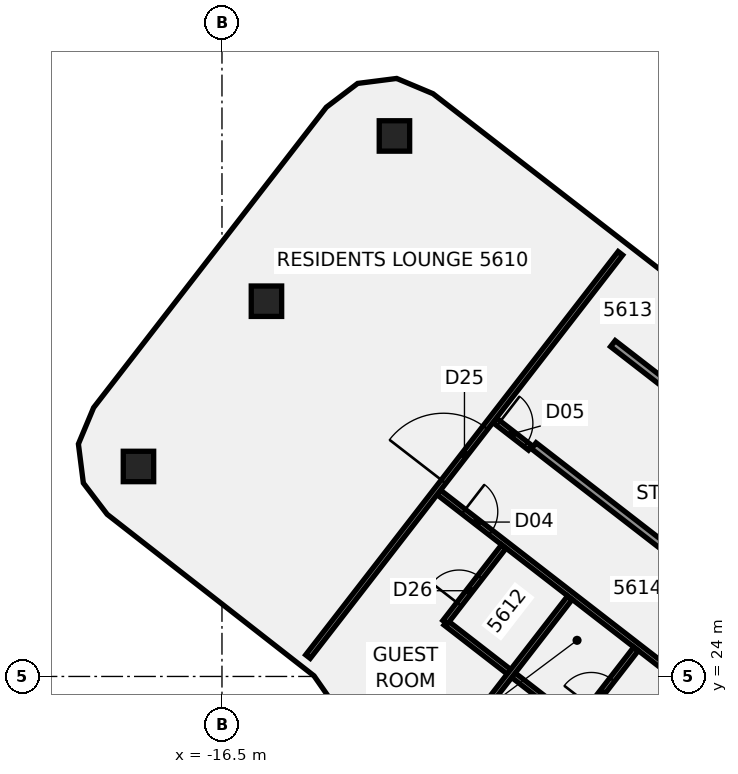
"""IFC4 building model, lengths in metres.
Left out: names, types, materials, properties, quantities, classifications, styles, units other than length and angle.
Written with IfcOpenShell. Run it as: python <this file> out.ifc"""

import sys

from ifc_helpers import new_model, si_unit, direction, frame, frame_2d, origin, origin_2d, place, context, subcontext, project, spatial, polyline, rectangle, outline, extrude, element, fill, save


model = new_model("IFC4")
c1 = context("Model", 3, precision=1e-05, world=origin(), true_north=direction((0.0, 1.0)))
c2 = subcontext(c1, "Body", "Model", "MODEL_VIEW")
j1 = project(units=[si_unit("LENGTHUNIT", "METRE"), si_unit("PLANEANGLEUNIT", "RADIAN")], contexts=[c1])
p1 = place(None, origin())
s1 = spatial("IfcSite", under=j1, at=p1, CompositionType="ELEMENT")
p2 = place(p1, origin())
s2 = spatial("IfcBuilding", under=s1, at=p2, CompositionType="ELEMENT")
p3 = place(p2, frame((0.0, 0.0, 223.5)))
s3 = spatial("IfcBuildingStorey", under=s2, at=p3, CompositionType="ELEMENT", Elevation=223.5)
p4 = place(p3, frame((-11.962, 38.222, -0.138), z_axis=(-0.01511273636, -0.110174546765, 0.993797350794), x_axis=(0.611561929785, 0.785306683932, 0.09636087489)))
e1 = element("IfcColumn", 1, at=p4, inside=s3, PredefinedType="COLUMN", context=c2, shape_type="SweptSolid", body=[
    extrude(rectangle(XDim=0.8, YDim=0.8, at=origin_2d()), origin(), (0.0, 0.0, 1.0), 3.619),
])
p5 = place(p3, frame((-15.33, 33.874, -0.138), z_axis=(0.00693650332, -0.126675366464, 0.991919974823), x_axis=(0.612511383983, 0.784620582282, 0.095918435924)))
e2 = element("IfcColumn", 2, at=p5, inside=s3, PredefinedType="COLUMN", context=c2, shape_type="SweptSolid", body=[
    extrude(rectangle(XDim=0.8, YDim=0.8, at=origin_2d()), origin(), (0.0, 0.0, 1.0), 3.625),
])
p6 = place(p3, frame((-18.698, 29.525, -0.138), z_axis=(0.028814660516, -0.142998629925, 0.989303344369), x_axis=(0.613802886994, 0.783674160284, 0.095398251662)))
e3 = element("IfcColumn", 3, at=p6, inside=s3, PredefinedType="COLUMN", context=c2, shape_type="SweptSolid", body=[
    extrude(rectangle(XDim=0.8, YDim=0.8, at=origin_2d()), origin(), (0.0, 0.0, 1.0), 3.635),
])
p7 = place(p3, frame((-10.791, 28.84, 0.0), z_axis=(0.0, 0.0, 1.0), x_axis=(0.790613040496, -0.612316111333, 0.0)))
e4 = element("IfcWall", 4, at=p7, inside=s3, PredefinedType="PARTITIONING", context=c2, shape_type="SweptSolid", body=[
    extrude(rectangle(XDim=8.82, YDim=0.15, at=frame_2d((4.41, 0.0))), origin(), (0.0, 0.0, 1.0), 2.864),
])
p8 = place(p7, frame((7.37, 0.0, 0.0)))
e5 = element("IfcOpeningElement", 5, at=p8, cuts=e4, PredefinedType="OPENING", context=c2, shape_type="SweptSolid", body=[
    extrude(rectangle(XDim=0.9, YDim=2.1, at=frame_2d((0.45, 1.05))), frame((0.0, 0.085, 0.0), z_axis=(0.0, -1.0, 0.0), x_axis=(1.0, 0.0, 0.0)), (0.0, 0.0, 1.0), 0.17),
])
p9 = place(p7, frame((0.82, 0.0, 0.0)))
e6 = element("IfcOpeningElement", 6, at=p9, cuts=e4, PredefinedType="OPENING", context=c2, shape_type="SweptSolid", body=[
    extrude(rectangle(XDim=0.9, YDim=2.1, at=frame_2d((0.45, 1.05))), frame((0.0, 0.085, 0.0), z_axis=(0.0, -1.0, 0.0), x_axis=(1.0, 0.0, 0.0)), (0.0, 0.0, 1.0), 0.17),
])
p10 = place(p3, frame((-10.612, 25.414, 0.0), z_axis=(0.0, 0.0, 1.0), x_axis=(0.790364214812, -0.612637256412, 0.0)))
e7 = element("IfcWall", 7, at=p10, inside=s3, PredefinedType="PARTITIONING", context=c2, shape_type="SweptSolid", body=[
    extrude(rectangle(XDim=4.36, YDim=0.15, at=frame_2d((2.18, 0.0))), origin(), (0.0, 0.0, 1.0), 2.864),
])
p11 = place(p3, frame((-9.322, 30.738, 0.0), z_axis=(0.0, 0.0, 1.0), x_axis=(0.790620333451, -0.612306694667, 0.0)))
e8 = element("IfcWall", 8, at=p11, inside=s3, PredefinedType="PARTITIONING", context=c2, shape_type="SweptSolid", body=[
    extrude(rectangle(XDim=1.18, YDim=0.15, at=frame_2d((0.59, 0.0))), origin(), (0.0, 0.0, 1.0), 2.864),
])
p12 = place(p11, frame((0.13, 0.0, 0.0)))
e9 = element("IfcOpeningElement", 9, at=p12, cuts=e8, PredefinedType="OPENING", context=c2, shape_type="SweptSolid", body=[
    extrude(rectangle(XDim=0.9, YDim=2.1, at=frame_2d((0.45, 1.05))), frame((0.0, 0.085, 0.0), z_axis=(0.0, -1.0, 0.0), x_axis=(1.0, 0.0, 0.0)), (0.0, 0.0, 1.0), 0.17),
])
p13 = place(p3, frame((-14.237, 24.522, 0.0), z_axis=(0.0, 0.0, 1.0), x_axis=(0.612428480312, 0.79052599989, 0.0)))
e10 = element("IfcWall", 10, at=p13, inside=s3, PredefinedType="PARTITIONING", context=c2, shape_type="SweptSolid", body=[
    extrude(rectangle(XDim=13.423, YDim=0.15, at=frame_2d((6.711, 0.0))), origin(), (0.0, 0.0, 1.0), 2.864),
])
p14 = place(p13, frame((5.824, 0.0, 0.0)))
e11 = element("IfcOpeningElement", 11, at=p14, cuts=e10, PredefinedType="OPENING", context=c2, shape_type="SweptSolid", body=[
    extrude(rectangle(XDim=1.8, YDim=2.1, at=frame_2d((0.9, 1.05))), frame((0.0, 0.085, 0.0), z_axis=(0.0, -1.0, 0.0), x_axis=(1.0, 0.0, 0.0)), (0.0, 0.0, 1.0), 0.17),
])
p15 = place(p3, frame((-9.68, 23.057, 0.0), z_axis=(0.0, 0.0, 1.0), x_axis=(0.612369549525, 0.790571650652, 0.0)))
e12 = element("IfcWall", 12, at=p15, inside=s3, PredefinedType="PARTITIONING", context=c2, shape_type="SweptSolid", body=[
    extrude(rectangle(XDim=3.811, YDim=0.15, at=frame_2d((1.906, 0.0))), origin(), (0.0, 0.0, 1.0), 2.864),
])
p16 = place(p3, frame((-10.628, 25.426, 0.0), z_axis=(0.0, 0.0, 1.0), x_axis=(0.61242333075, 0.790529989281, 0.0)))
e13 = element("IfcWall", 13, at=p16, inside=s3, PredefinedType="PARTITIONING", context=c2, shape_type="SweptSolid", body=[
    extrude(rectangle(XDim=2.52, YDim=0.15, at=frame_2d((1.26, 0.0))), origin(), (0.0, 0.0, 1.0), 2.864),
])
p17 = place(p16, frame((0.6, 0.0, 0.0)))
e14 = element("IfcOpeningElement", 14, at=p17, cuts=e13, PredefinedType="OPENING", context=c2, shape_type="SweptSolid", body=[
    extrude(rectangle(XDim=0.9, YDim=2.1, at=frame_2d((0.45, 1.05))), frame((0.0, 0.085, 0.0), z_axis=(0.0, -1.0, 0.0), x_axis=(1.0, 0.0, 0.0)), (0.0, 0.0, 1.0), 0.17),
])
p18 = place(p3, frame((-7.15, 22.731, 0.0), z_axis=(0.0, 0.0, 1.0), x_axis=(0.612430986652, 0.790524058197, 0.0)))
e15 = element("IfcWall", 15, at=p18, inside=s3, PredefinedType="PARTITIONING", context=c2, shape_type="SweptSolid", body=[
    extrude(rectangle(XDim=2.521, YDim=0.15, at=frame_2d((1.26, 0.0))), origin(), (0.0, 0.0, 1.0), 2.864),
])
p19 = place(p18, frame((0.6, 0.0, 0.0)))
e16 = element("IfcOpeningElement", 16, at=p19, cuts=e15, PredefinedType="OPENING", context=c2, shape_type="SweptSolid", body=[
    extrude(rectangle(XDim=0.9, YDim=2.1, at=frame_2d((0.45, 1.05))), frame((0.0, 0.085, 0.0), z_axis=(0.0, -1.0, 0.0), x_axis=(1.0, 0.0, 0.0)), (0.0, 0.0, 1.0), 0.17),
])
p20 = place(p3, frame((-2.999, 25.967, -0.14), z_axis=(0.0, 0.0, 1.0), x_axis=(-0.790580869813, 0.612357647364, 0.0)))
e17 = element("IfcWall", 17, at=p20, inside=s3, PredefinedType="SHEAR", context=c2, shape_type="SweptSolid", body=[
    extrude(rectangle(XDim=6.7, YDim=0.2, at=frame_2d((3.35, 0.0))), origin(), (0.0, 0.0, 1.0), 3.004),
])
p21 = place(p20, frame((0.35, 0.0, 0.0)))
e18 = element("IfcOpeningElement", 18, at=p21, cuts=e17, PredefinedType="OPENING", context=c2, shape_type="SweptSolid", body=[
    extrude(rectangle(XDim=1.0, YDim=2.1, at=frame_2d((0.5, 1.05))), frame((0.0, 0.11, 0.0), z_axis=(0.0, -1.0, 0.0), x_axis=(1.0, 0.0, 0.0)), (0.0, 0.0, 1.0), 0.22),
])
p22 = place(p3, frame((-0.917, 28.655, -0.14), z_axis=(0.0, 0.0, 1.0), x_axis=(-0.790580869813, 0.612357647364, 0.0)))
e19 = element("IfcWall", 19, at=p22, inside=s3, PredefinedType="SHEAR", context=c2, shape_type="SweptSolid", body=[
    extrude(rectangle(XDim=6.7, YDim=0.2, at=frame_2d((3.35, 0.0))), origin(), (0.0, 0.0, 1.0), 3.004),
])
p23 = place(p3, frame((0.0, 0.0, -0.14)))
e20 = element("IfcWall", 20, at=p23, inside=s3, PredefinedType="SHEAR", context=c2, shape_type="SweptSolid", body=[
    extrude(outline(polyline([(-6.117, 32.556), (-6.275, 32.679), (-8.234, 30.149), (-8.076, 30.026), (-6.117, 32.556)])), origin(), (0.0, 0.0, 1.0), 3.004),
])
p24 = place(p9, frame((0.9, 0.0, 0.0), z_axis=(0.0, 0.0, 1.0), x_axis=(-1.0, 0.0, 0.0)))
e21 = element("IfcDoor", 21, at=p24, inside=s3, OperationType="SINGLE_SWING_LEFT", PredefinedType="DOOR", context=c2, shape_type="SweptSolid", body=[
    extrude(rectangle(XDim=0.9, YDim=2.1, at=frame_2d((0.45, 1.05))), frame((0.0, 0.025, 0.0), z_axis=(0.0, -1.0, 0.0), x_axis=(1.0, 0.0, 0.0)), (0.0, 0.0, 1.0), 0.05),
])
fill(e6, e21)
p25 = place(p12, origin())
e22 = element("IfcDoor", 22, at=p25, inside=s3, OperationType="SINGLE_SWING_RIGHT", PredefinedType="DOOR", context=c2, shape_type="SweptSolid", body=[
    extrude(rectangle(XDim=0.9, YDim=2.1, at=frame_2d((0.45, 1.05))), frame((0.0, 0.025, 0.0), z_axis=(0.0, -1.0, 0.0), x_axis=(1.0, 0.0, 0.0)), (0.0, 0.0, 1.0), 0.05),
])
fill(e9, e22)
p26 = place(p14, origin())
e23 = element("IfcDoor", 23, at=p26, inside=s3, OperationType="DOUBLE_DOOR_SINGLE_SWING", PredefinedType="DOOR", context=c2, shape_type="SweptSolid", body=[
    extrude(rectangle(XDim=1.8, YDim=2.1, at=frame_2d((0.9, 1.05))), frame((0.0, 0.025, 0.0), z_axis=(0.0, -1.0, 0.0), x_axis=(1.0, 0.0, 0.0)), (0.0, 0.0, 1.0), 0.05),
])
fill(e11, e23)
p27 = place(p17, frame((0.9, 0.0, 0.0), z_axis=(0.0, 0.0, 1.0), x_axis=(-1.0, 0.0, 0.0)))
e24 = element("IfcDoor", 24, at=p27, inside=s3, OperationType="SINGLE_SWING_LEFT", PredefinedType="DOOR", context=c2, shape_type="SweptSolid", body=[
    extrude(rectangle(XDim=0.9, YDim=2.1, at=frame_2d((0.45, 1.05))), frame((0.0, 0.025, 0.0), z_axis=(0.0, -1.0, 0.0), x_axis=(1.0, 0.0, 0.0)), (0.0, 0.0, 1.0), 0.05),
])
fill(e14, e24)
p28 = place(p19, origin())
e25 = element("IfcDoor", 25, at=p28, inside=s3, OperationType="SINGLE_SWING_RIGHT", PredefinedType="DOOR", context=c2, shape_type="SweptSolid", body=[
    extrude(rectangle(XDim=0.9, YDim=2.1, at=frame_2d((0.45, 1.05))), frame((0.0, 0.025, 0.0), z_axis=(0.0, -1.0, 0.0), x_axis=(1.0, 0.0, 0.0)), (0.0, 0.0, 1.0), 0.05),
])
fill(e16, e25)
save(model, sys.argv[1])
